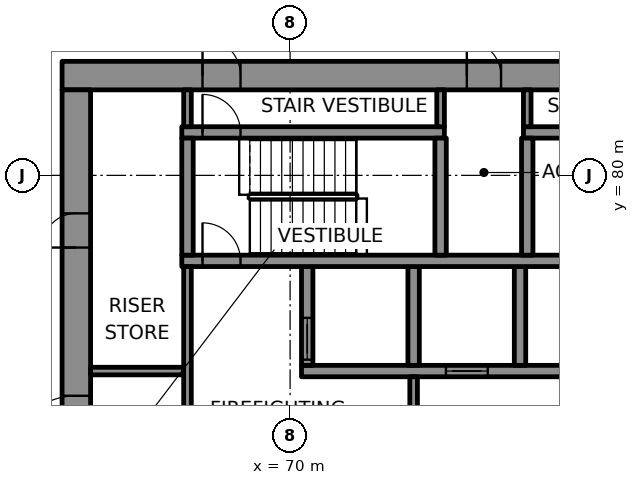
"""IFC4 building model, lengths in metres.
Left out: names, types, materials, properties, quantities, classifications, styles, units other than length and angle.
Written with IfcOpenShell. Run it as: python <this file> out.ifc"""

import sys

from ifc_helpers import new_model, si_unit, direction, frame, frame_2d, origin, place, context, subcontext, project, spatial, rectangle, extrude, element, fill, save


model = new_model("IFC4")
c1 = context("Model", 3, precision=1e-05, world=origin(), true_north=direction((0.0, 1.0)))
c2 = subcontext(c1, "Body", "Model", "MODEL_VIEW")
j1 = project(units=[si_unit("LENGTHUNIT", "METRE"), si_unit("PLANEANGLEUNIT", "RADIAN")], contexts=[c1])
p1 = place(None, origin())
s1 = spatial("IfcSite", under=j1, at=p1, CompositionType="ELEMENT")
p2 = place(p1, origin())
s2 = spatial("IfcBuilding", under=s1, at=p2, CompositionType="ELEMENT")
p3 = place(p2, frame((0.0, 0.0, 159.7)))
s3 = spatial("IfcBuildingStorey", under=s2, at=p3, CompositionType="ELEMENT", Elevation=159.7)
p4 = place(p3, frame((64.0, 82.625, 0.0), z_axis=(0.0, 0.0, 1.0), x_axis=(1.0, 0.0, 0.0)))
e1 = element("IfcWall", 1, at=p4, inside=s3, PredefinedType="SHEAR", context=c2, shape_type="SweptSolid", body=[
    extrude(rectangle(XDim=22.0, YDim=0.75, at=frame_2d((11.0, 0.0))), origin(), (0.0, 0.0, 1.0), 3.7),
])
p5 = place(p4, frame((3.695, 0.0, 0.0)))
e2 = element("IfcOpeningElement", 2, at=p5, cuts=e1, PredefinedType="OPENING", context=c2, shape_type="SweptSolid", body=[
    extrude(rectangle(XDim=1.0, YDim=2.1, at=frame_2d((0.5, 1.05))), frame((0.0, 0.385, 0.0), z_axis=(0.0, -1.0, 0.0), x_axis=(1.0, 0.0, 0.0)), (0.0, 0.0, 1.0), 0.77),
])
p6 = place(p4, frame((17.505, 0.0, 0.0)))
e3 = element("IfcOpeningElement", 3, at=p6, cuts=e1, PredefinedType="OPENING", context=c2, shape_type="SweptSolid", body=[
    extrude(rectangle(XDim=1.0, YDim=2.1, at=frame_2d((0.5, 1.05))), frame((0.0, 0.385, 0.0), z_axis=(0.0, -1.0, 0.0), x_axis=(1.0, 0.0, 0.0)), (0.0, 0.0, 1.0), 0.77),
])
p7 = place(p4, frame((10.65, 0.0, 0.0)))
e4 = element("IfcOpeningElement", 4, at=p7, cuts=e1, PredefinedType="OPENING", context=c2, shape_type="SweptSolid", body=[
    extrude(rectangle(XDim=0.9, YDim=2.1, at=frame_2d((0.45, 1.05))), frame((0.0, 0.385, 0.0), z_axis=(0.0, -1.0, 0.0), x_axis=(1.0, 0.0, 0.0)), (0.0, 0.0, 1.0), 0.77),
])
p8 = place(p3, frame((64.375, 67.75, 0.0), z_axis=(0.0, 0.0, 1.0), x_axis=(0.0, 1.0, 0.0)))
e5 = element("IfcWall", 5, at=p8, inside=s3, PredefinedType="SHEAR", context=c2, shape_type="SweptSolid", body=[
    extrude(rectangle(XDim=14.5, YDim=0.75, at=frame_2d((7.25, 0.0))), origin(), (0.0, 0.0, 1.0), 3.7),
])
p9 = place(p8, frame((4.65, 0.0, 0.0)))
e6 = element("IfcOpeningElement", 6, at=p9, cuts=e5, PredefinedType="OPENING", context=c2, shape_type="SweptSolid", body=[
    extrude(rectangle(XDim=1.8, YDim=2.1, at=frame_2d((0.9, 1.05))), frame((0.0, 0.385, 0.0), z_axis=(0.0, -1.0, 0.0), x_axis=(1.0, 0.0, 0.0)), (0.0, 0.0, 1.0), 0.77),
])
p10 = place(p8, frame((2.55, 0.0, 0.0)))
e7 = element("IfcOpeningElement", 7, at=p10, cuts=e5, PredefinedType="OPENING", context=c2, shape_type="SweptSolid", body=[
    extrude(rectangle(XDim=0.9, YDim=2.1, at=frame_2d((0.45, 1.05))), frame((0.0, 0.385, 0.0), z_axis=(0.0, -1.0, 0.0), x_axis=(1.0, 0.0, 0.0)), (0.0, 0.0, 1.0), 0.77),
])
p11 = place(p8, frame((10.35, 0.0, 0.0)))
e8 = element("IfcOpeningElement", 8, at=p11, cuts=e5, PredefinedType="OPENING", context=c2, shape_type="SweptSolid", body=[
    extrude(rectangle(XDim=0.9, YDim=2.1, at=frame_2d((0.45, 1.05))), frame((0.0, 0.385, 0.0), z_axis=(0.0, -1.0, 0.0), x_axis=(1.0, 0.0, 0.0)), (0.0, 0.0, 1.0), 0.77),
])
p12 = place(p3, frame((70.3, 74.85, 0.0), z_axis=(0.0, 0.0, 1.0), x_axis=(1.0, 0.0, 0.0)))
e9 = element("IfcWall", 9, at=p12, inside=s3, PredefinedType="SHEAR", context=c2, shape_type="SweptSolid", body=[
    extrude(rectangle(XDim=14.3, YDim=0.3, at=frame_2d((7.15, 0.0))), origin(), (0.0, 0.0, 1.0), 3.7),
])
p13 = place(p12, frame((3.8, 0.0, 0.0)))
e10 = element("IfcOpeningElement", 10, at=p13, cuts=e9, PredefinedType="OPENING", context=c2, shape_type="SweptSolid", body=[
    extrude(rectangle(XDim=1.1, YDim=2.1, at=frame_2d((0.55, 1.05))), frame((0.0, 0.16, 0.0), z_axis=(0.0, -1.0, 0.0), x_axis=(1.0, 0.0, 0.0)), (0.0, 0.0, 1.0), 0.32),
])
p14 = place(p12, frame((12.2, 0.0, 0.0)))
e11 = element("IfcOpeningElement", 11, at=p14, cuts=e9, PredefinedType="OPENING", context=c2, shape_type="SweptSolid", body=[
    extrude(rectangle(XDim=1.1, YDim=2.1, at=frame_2d((0.55, 1.05))), frame((0.0, 0.16, 0.0), z_axis=(0.0, -1.0, 0.0), x_axis=(1.0, 0.0, 0.0)), (0.0, 0.0, 1.0), 0.32),
])
p15 = place(p3, frame((70.45, 75.0, 0.0), z_axis=(0.0, 0.0, 1.0), x_axis=(0.0, 1.0, 0.0)))
e12 = element("IfcWall", 12, at=p15, inside=s3, PredefinedType="SHEAR", context=c2, shape_type="SweptSolid", body=[
    extrude(rectangle(XDim=2.6, YDim=0.3, at=frame_2d((1.3, 0.0))), origin(), (0.0, 0.0, 1.0), 3.7),
])
p16 = place(p15, frame((0.15, 0.0, 0.0)))
e13 = element("IfcOpeningElement", 13, at=p16, cuts=e12, PredefinedType="OPENING", context=c2, shape_type="SweptSolid", body=[
    extrude(rectangle(XDim=1.1, YDim=2.1, at=frame_2d((0.55, 1.05))), frame((0.0, 0.16, 0.0), z_axis=(0.0, -1.0, 0.0), x_axis=(1.0, 0.0, 0.0)), (0.0, 0.0, 1.0), 0.32),
])
for number, where, z_axis, x_axis in (
    (14, (73.25, 75.0, 0.0), (0.0, 0.0, 1.0), (0.0, 1.0, 0.0)),
    (15, (76.05, 75.0, 0.0), (0.0, 0.0, 1.0), (0.0, 1.0, 0.0)),
):
    element("IfcWall", number, at=place(p3, frame(where, z_axis=z_axis, x_axis=x_axis)), inside=s3, PredefinedType="SHEAR", context=c2, shape_type="SweptSolid", body=[
        extrude(rectangle(XDim=2.6, YDim=0.3, at=frame_2d((1.3, 0.0))), origin(), (0.0, 0.0, 1.0), 3.7),
    ])
p17 = place(p3, frame((67.15, 77.75, 0.0), z_axis=(0.0, 0.0, 1.0), x_axis=(1.0, 0.0, 0.0)))
e16 = element("IfcWall", 16, at=p17, inside=s3, PredefinedType="SHEAR", context=c2, shape_type="SweptSolid", body=[
    extrude(rectangle(XDim=17.45, YDim=0.3, at=frame_2d((8.725, 0.0))), origin(), (0.0, 0.0, 1.0), 3.7),
])
p18 = place(p17, frame((0.545, 0.0, 0.0)))
e17 = element("IfcOpeningElement", 17, at=p18, cuts=e16, PredefinedType="OPENING", context=c2, shape_type="SweptSolid", body=[
    extrude(rectangle(XDim=1.0, YDim=2.1, at=frame_2d((0.5, 1.05))), frame((0.0, 0.16, 0.0), z_axis=(0.0, -1.0, 0.0), x_axis=(1.0, 0.0, 0.0)), (0.0, 0.0, 1.0), 0.32),
])
p19 = place(p3, frame((67.15, 81.13, 0.0), z_axis=(0.0, 0.0, 1.0), x_axis=(1.0, 0.0, 0.0)))
e18 = element("IfcWall", 18, at=p19, inside=s3, PredefinedType="SHEAR", context=c2, shape_type="SweptSolid", body=[
    extrude(rectangle(XDim=6.91, YDim=0.3, at=frame_2d((3.455, 0.0))), origin(), (0.0, 0.0, 1.0), 3.7),
])
p20 = place(p19, frame((0.545, 0.0, 0.0)))
e19 = element("IfcOpeningElement", 19, at=p20, cuts=e18, PredefinedType="OPENING", context=c2, shape_type="SweptSolid", body=[
    extrude(rectangle(XDim=1.0, YDim=2.1, at=frame_2d((0.5, 1.05))), frame((0.0, 0.16, 0.0), z_axis=(0.0, -1.0, 0.0), x_axis=(1.0, 0.0, 0.0)), (0.0, 0.0, 1.0), 0.32),
])
p21 = place(p3, frame((76.14, 81.13, 0.0), z_axis=(0.0, 0.0, 1.0), x_axis=(1.0, 0.0, 0.0)))
e20 = element("IfcWall", 20, at=p21, inside=s3, PredefinedType="SHEAR", context=c2, shape_type="SweptSolid", body=[
    extrude(rectangle(XDim=6.86, YDim=0.3, at=frame_2d((3.43, 0.0))), origin(), (0.0, 0.0, 1.0), 3.7),
])
p22 = place(p21, frame((5.365, 0.0, 0.0)))
e21 = element("IfcOpeningElement", 21, at=p22, cuts=e20, PredefinedType="OPENING", context=c2, shape_type="SweptSolid", body=[
    extrude(rectangle(XDim=1.0, YDim=2.1, at=frame_2d((0.5, 1.05))), frame((0.0, 0.16, 0.0), z_axis=(0.0, -1.0, 0.0), x_axis=(1.0, 0.0, 0.0)), (0.0, 0.0, 1.0), 0.32),
])
for number, where, z_axis, x_axis in (
    (22, (67.3, 77.9, 0.0), (0.0, 0.0, 1.0), (0.0, 1.0, 0.0)),
    (23, (73.96, 77.9, 0.0), (0.0, 0.0, 1.0), (0.0, 1.0, 0.0)),
    (24, (76.24, 77.9, 0.0), (0.0, 0.0, 1.0), (0.0, 1.0, 0.0)),
):
    element("IfcWall", number, at=place(p3, frame(where, z_axis=z_axis, x_axis=x_axis)), inside=s3, PredefinedType="SHEAR", context=c2, shape_type="SweptSolid", body=[
        extrude(rectangle(XDim=3.08, YDim=0.3, at=frame_2d((1.54, 0.0))), origin(), (0.0, 0.0, 1.0), 3.7),
    ])
p23 = place(p3, frame((69.117, 111.388, 0.0), z_axis=(0.0, 0.0, 1.0), x_axis=(-0.49999896751, -0.866025999892, 0.0)))
e25 = element("IfcWall", 25, at=p23, inside=s3, PredefinedType="SOLIDWALL", context=c2, shape_type="SweptSolid", body=[
    extrude(rectangle(XDim=57.143, YDim=0.8, at=frame_2d((28.571, 0.0))), origin(), (0.0, 0.0, 1.0), 0.9),
])
p24 = place(p3, frame((64.75, 74.85, 0.0), z_axis=(0.0, 0.0, 1.0), x_axis=(1.0, 0.0, 0.0)))
e26 = element("IfcWall", 26, at=p24, inside=s3, PredefinedType="PARTITIONING", context=c2, shape_type="SweptSolid", body=[
    extrude(rectangle(XDim=2.45, YDim=0.2, at=frame_2d((1.225, 0.0))), origin(), (0.0, 0.0, 1.0), 3.7),
])
p25 = place(p3, frame((67.3, 71.85, 0.0), z_axis=(0.0, 0.0, 1.0), x_axis=(0.0, 1.0, 0.0)))
e27 = element("IfcWall", 27, at=p25, inside=s3, PredefinedType="PARTITIONING", context=c2, shape_type="SweptSolid", body=[
    extrude(rectangle(XDim=5.75, YDim=0.2, at=frame_2d((2.875, 0.0))), origin(), (0.0, 0.0, 1.0), 3.7),
])
p26 = place(p25, frame((0.85, 0.0, 0.0)))
e28 = element("IfcOpeningElement", 28, at=p26, cuts=e27, PredefinedType="OPENING", context=c2, shape_type="SweptSolid", body=[
    extrude(rectangle(XDim=1.2, YDim=2.1, at=frame_2d((0.6, 1.05))), frame((0.0, 0.11, 0.0), z_axis=(0.0, -1.0, 0.0), x_axis=(1.0, 0.0, 0.0)), (0.0, 0.0, 1.0), 0.22),
])
p27 = place(p3, frame((67.3, 81.28, 0.0), z_axis=(0.0, 0.0, 1.0), x_axis=(0.0, 1.0, 0.0)))
e29 = element("IfcWall", 29, at=p27, inside=s3, PredefinedType="PARTITIONING", context=c2, shape_type="SweptSolid", body=[
    extrude(rectangle(XDim=0.97, YDim=0.2, at=frame_2d((0.485, 0.0))), origin(), (0.0, 0.0, 1.0), 3.7),
])
p28 = place(p3, frame((73.25, 71.9, 0.0), z_axis=(0.0, 0.0, 1.0), x_axis=(0.0, 1.0, 0.0)))
e30 = element("IfcWall", 30, at=p28, inside=s3, PredefinedType="PARTITIONING", context=c2, shape_type="SweptSolid", body=[
    extrude(rectangle(XDim=2.8, YDim=0.2, at=frame_2d((1.4, 0.0))), origin(), (0.0, 0.0, 1.0), 3.7),
])
p29 = place(p28, frame((0.8, 0.0, 0.0)))
e31 = element("IfcOpeningElement", 31, at=p29, cuts=e30, PredefinedType="OPENING", context=c2, shape_type="SweptSolid", body=[
    extrude(rectangle(XDim=1.2, YDim=2.1, at=frame_2d((0.6, 1.05))), frame((0.0, 0.11, 0.0), z_axis=(0.0, -1.0, 0.0), x_axis=(1.0, 0.0, 0.0)), (0.0, 0.0, 1.0), 0.22),
])
for number, where, z_axis, x_axis in (
    (32, (73.96, 81.28, 0.0), (0.0, 0.0, 1.0), (0.0, 1.0, 0.0)),
    (33, (76.24, 81.28, 0.0), (0.0, 0.0, 1.0), (0.0, 1.0, 0.0)),
):
    element("IfcWall", number, at=place(p3, frame(where, z_axis=z_axis, x_axis=x_axis)), inside=s3, PredefinedType="PARTITIONING", context=c2, shape_type="SweptSolid", body=[
        extrude(rectangle(XDim=0.97, YDim=0.2, at=frame_2d((0.485, 0.0))), origin(), (0.0, 0.0, 1.0), 3.7),
    ])
p30 = place(p16, origin())
e34 = element("IfcDoor", 34, at=p30, inside=s3, OperationType="DOUBLE_DOOR_SLIDING", PredefinedType="DOOR", context=c2, shape_type="SweptSolid", body=[
    extrude(rectangle(XDim=1.1, YDim=2.1, at=frame_2d((0.55, 1.05))), frame((0.0, 0.025, 0.0), z_axis=(0.0, -1.0, 0.0), x_axis=(1.0, 0.0, 0.0)), (0.0, 0.0, 1.0), 0.05),
])
fill(e13, e34)
p31 = place(p13, origin())
e35 = element("IfcDoor", 35, at=p31, inside=s3, OperationType="DOUBLE_DOOR_SLIDING", PredefinedType="DOOR", context=c2, shape_type="SweptSolid", body=[
    extrude(rectangle(XDim=1.1, YDim=2.1, at=frame_2d((0.55, 1.05))), frame((0.0, 0.025, 0.0), z_axis=(0.0, -1.0, 0.0), x_axis=(1.0, 0.0, 0.0)), (0.0, 0.0, 1.0), 0.05),
])
fill(e10, e35)
p32 = place(p18, origin())
e36 = element("IfcDoor", 36, at=p32, inside=s3, OperationType="SINGLE_SWING_LEFT", PredefinedType="DOOR", context=c2, shape_type="SweptSolid", body=[
    extrude(rectangle(XDim=1.0, YDim=2.1, at=frame_2d((0.5, 1.05))), frame((0.0, 0.025, 0.0), z_axis=(0.0, -1.0, 0.0), x_axis=(1.0, 0.0, 0.0)), (0.0, 0.0, 1.0), 0.05),
])
fill(e17, e36)
p33 = place(p20, origin())
e37 = element("IfcDoor", 37, at=p33, inside=s3, OperationType="SINGLE_SWING_RIGHT", PredefinedType="DOOR", context=c2, shape_type="SweptSolid", body=[
    extrude(rectangle(XDim=1.0, YDim=2.1, at=frame_2d((0.5, 1.05))), frame((0.0, 0.025, 0.0), z_axis=(0.0, -1.0, 0.0), x_axis=(1.0, 0.0, 0.0)), (0.0, 0.0, 1.0), 0.05),
])
fill(e19, e37)
p34 = place(p5, origin())
e38 = element("IfcDoor", 38, at=p34, inside=s3, OperationType="SINGLE_SWING_LEFT", PredefinedType="DOOR", context=c2, shape_type="SweptSolid", body=[
    extrude(rectangle(XDim=1.0, YDim=2.1, at=frame_2d((0.5, 1.05))), frame((0.0, 0.095, 0.0), z_axis=(0.0, -1.0, 0.0), x_axis=(1.0, 0.0, 0.0)), (0.0, 0.0, 1.0), 0.19),
])
fill(e2, e38)
p35 = place(p9, origin())
e39 = element("IfcDoor", 39, at=p35, inside=s3, OperationType="SINGLE_SWING_LEFT", PredefinedType="DOOR", context=c2, shape_type="SweptSolid", body=[
    extrude(rectangle(XDim=1.8, YDim=2.1, at=frame_2d((0.9, 1.05))), frame((0.0, 0.095, 0.0), z_axis=(0.0, -1.0, 0.0), x_axis=(1.0, 0.0, 0.0)), (0.0, 0.0, 1.0), 0.19),
])
fill(e6, e39)
p36 = place(p11, origin())
e40 = element("IfcDoor", 40, at=p36, inside=s3, OperationType="SINGLE_SWING_RIGHT", PredefinedType="DOOR", context=c2, shape_type="SweptSolid", body=[
    extrude(rectangle(XDim=0.9, YDim=2.1, at=frame_2d((0.45, 1.05))), frame((0.0, 0.095, 0.0), z_axis=(0.0, -1.0, 0.0), x_axis=(1.0, 0.0, 0.0)), (0.0, 0.0, 1.0), 0.19),
])
fill(e8, e40)
p37 = place(p7, origin())
e41 = element("IfcDoor", 41, at=p37, inside=s3, OperationType="SINGLE_SWING_LEFT", PredefinedType="DOOR", context=c2, shape_type="SweptSolid", body=[
    extrude(rectangle(XDim=0.9, YDim=2.1, at=frame_2d((0.45, 1.05))), frame((0.0, 0.095, 0.0), z_axis=(0.0, -1.0, 0.0), x_axis=(1.0, 0.0, 0.0)), (0.0, 0.0, 1.0), 0.19),
])
fill(e4, e41)
save(model, sys.argv[1])
